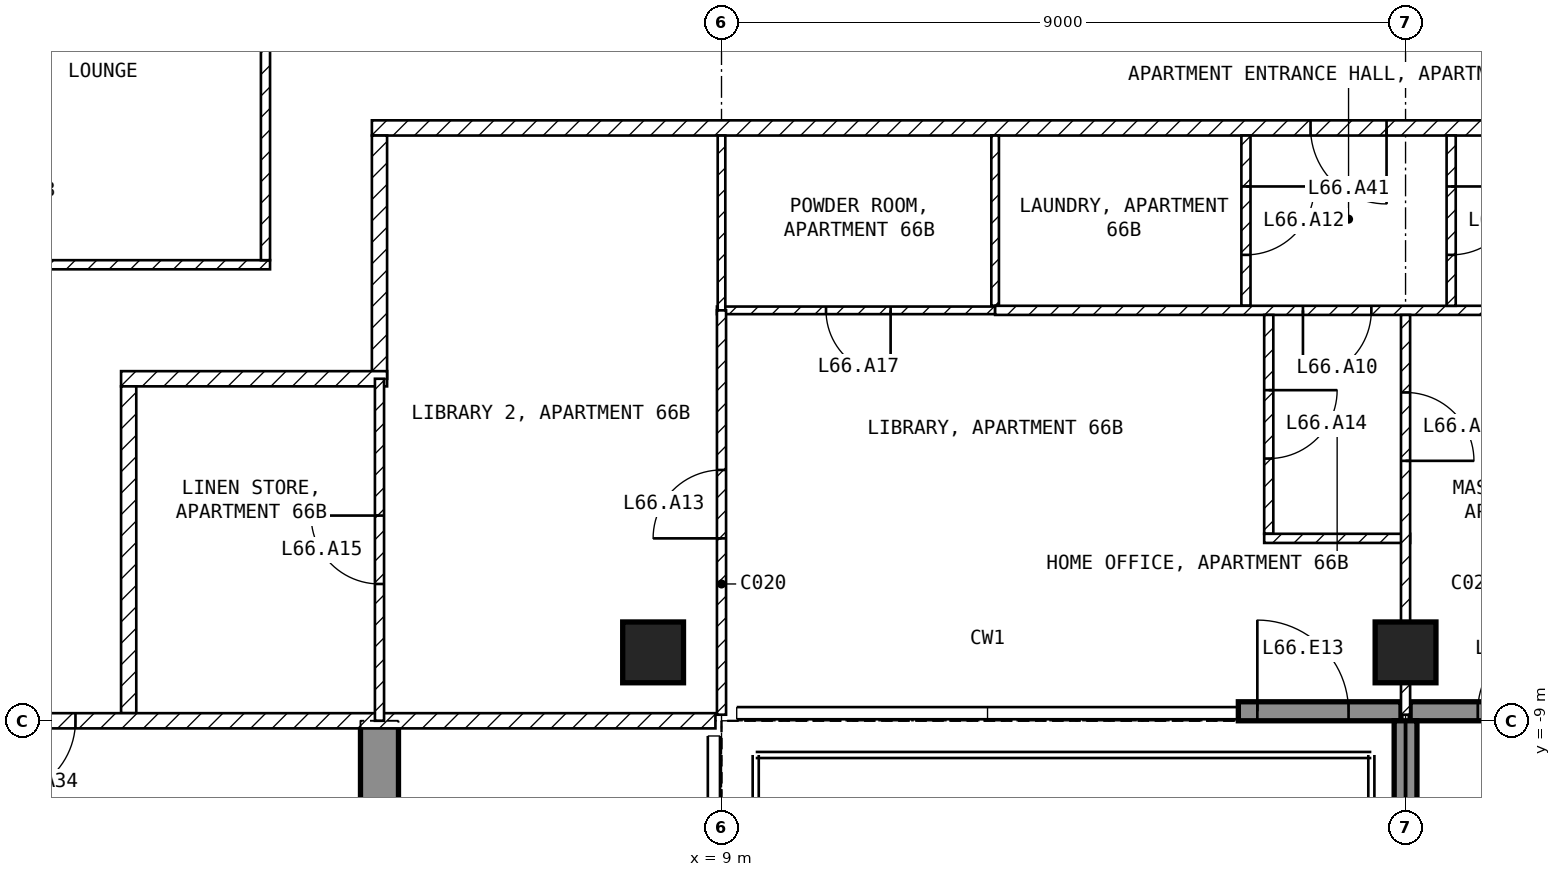
"""IFC4 building model, lengths in metres.
Left out: names, types, materials, properties, quantities, classifications, styles, units other than length and angle.
Written with IfcOpenShell. Run it as: python <this file> out.ifc"""

import sys

from ifc_helpers import new_model, si_unit, direction, frame, frame_2d, origin, origin_2d, place, context, subcontext, project, spatial, polyline, rectangle, outline, extrude, element, fill, save


model = new_model("IFC4")
c1 = context("Model", 3, precision=1e-05, world=origin(), true_north=direction((0.0, 1.0)))
c2 = subcontext(c1, "Body", "Model", "MODEL_VIEW")
j1 = project(units=[si_unit("LENGTHUNIT", "METRE"), si_unit("PLANEANGLEUNIT", "RADIAN")], contexts=[c1])
p1 = place(None, origin())
s1 = spatial("IfcSite", under=j1, at=p1, CompositionType="ELEMENT")
p2 = place(p1, origin())
s2 = spatial("IfcBuilding", under=s1, at=p2, CompositionType="ELEMENT")
p3 = place(p2, frame((0.0, 0.0, 260.5)))
s3 = spatial("IfcBuildingStorey", under=s2, at=p3, CompositionType="ELEMENT", Elevation=260.5)
for number, where, z_axis, x_axis in (
    (1, (8.1, -8.1, -0.25), (0.0, 0.0, 1.0), (1.0, 0.0, 0.0)),
    (2, (18.0, -8.1, -0.25), (0.0, 0.0, 1.0), (1.0, 0.0, 0.0)),
):
    element("IfcColumn", number, at=place(p3, frame(where, z_axis=z_axis, x_axis=x_axis)), inside=s3, PredefinedType="COLUMN", context=c2, shape_type="SweptSolid", body=[
        extrude(rectangle(XDim=0.8, YDim=0.8, at=origin_2d()), origin(), (0.0, 0.0, 1.0), 3.5),
    ])
p4 = place(p3, frame((4.25, -16.7, -0.25), z_axis=(1.0, 0.0, 0.0), x_axis=(0.0, 1.0, 0.0)))
e3 = element("IfcWall", 3, at=p4, inside=s3, PredefinedType="SHEAR", context=c2, shape_type="SweptSolid", body=[
    extrude(outline(polyline([(0.0, 0.0), (3.2, 0.0), (3.2, 2.65), (5.6, 2.65), (5.6, 0.0), (7.7, 0.0), (7.7, 3.5), (0.0, 3.5), (0.0, 0.0)])), origin(), (0.0, 0.0, 1.0), 0.5),
])
p5 = place(p3, frame((15.8, -8.875, 0.0), z_axis=(0.0, 0.0, 1.0), x_axis=(1.0, 0.0, 0.0)))
e4 = element("IfcWall", 4, at=p5, inside=s3, PredefinedType="SOLIDWALL", context=c2, shape_type="SweptSolid", body=[
    extrude(rectangle(XDim=2.14, YDim=0.25, at=frame_2d((1.07, 0.0))), origin(), (0.0, 0.0, 1.0), 3.25),
])
p6 = place(p5, frame((0.25, 0.0, 0.0)))
e5 = element("IfcOpeningElement", 5, at=p6, cuts=e4, PredefinedType="OPENING", context=c2, shape_type="SweptSolid", body=[
    extrude(rectangle(XDim=1.2, YDim=2.4, at=frame_2d((0.6, 1.2))), frame((0.0, 0.135, 0.0), z_axis=(0.0, -1.0, 0.0), x_axis=(1.0, 0.0, 0.0)), (0.0, 0.0, 1.0), 0.27),
])
p7 = place(p3, frame((18.06, -8.875, 0.0), z_axis=(0.0, 0.0, 1.0), x_axis=(1.0, 0.0, 0.0)))
e6 = element("IfcWall", 6, at=p7, inside=s3, PredefinedType="SOLIDWALL", context=c2, shape_type="SweptSolid", body=[
    extrude(rectangle(XDim=3.04, YDim=0.25, at=frame_2d((1.52, 0.0))), origin(), (0.0, 0.0, 1.0), 3.25),
])
p8 = place(p7, frame((0.89, 0.0, 0.0)))
e7 = element("IfcOpeningElement", 7, at=p8, cuts=e6, PredefinedType="OPENING", context=c2, shape_type="SweptSolid", body=[
    extrude(rectangle(XDim=1.0, YDim=2.4, at=frame_2d((0.5, 1.2))), frame((0.0, 0.135, 0.0), z_axis=(0.0, -1.0, 0.0), x_axis=(1.0, 0.0, 0.0)), (0.0, 0.0, 1.0), 0.27),
])
p9 = place(p3, frame((18.0, -9.0, 0.0), z_axis=(0.0, 0.0, 1.0), x_axis=(0.0, -1.0, 0.0)))
e8 = element("IfcWall", 8, at=p9, inside=s3, PredefinedType="SOLIDWALL", context=c2, shape_type="SweptSolid", body=[
    extrude(rectangle(XDim=2.74, YDim=0.3, at=frame_2d((1.37, 0.0))), origin(), (0.0, 0.0, 1.0), 3.25),
])
p10 = place(p3, frame((-3.06, -3.0, 0.0), z_axis=(0.0, 0.0, 1.0), x_axis=(1.0, 0.0, 0.0)))
e9 = element("IfcWall", 9, at=p10, inside=s3, PredefinedType="PARTITIONING", context=c2, shape_type="SweptSolid", body=[
    extrude(rectangle(XDim=6.12, YDim=0.12, at=frame_2d((3.06, 0.0))), origin(), (0.0, 0.0, 1.0), 3.25),
])
p11 = place(p3, frame((3.0, -2.94, 0.0), z_axis=(0.0, 0.0, 1.0), x_axis=(0.0, 1.0, 0.0)))
e10 = element("IfcWall", 10, at=p11, inside=s3, PredefinedType="PARTITIONING", context=c2, shape_type="SweptSolid", body=[
    extrude(rectangle(XDim=5.88, YDim=0.12, at=frame_2d((2.94, 0.0))), origin(), (0.0, 0.0, 1.0), 3.25),
])
p12 = place(p3, frame((21.6, -1.2, 0.0), z_axis=(0.0, 0.0, 1.0), x_axis=(-1.0, 0.0, 0.0)))
e11 = element("IfcWall", 11, at=p12, inside=s3, PredefinedType="PARTITIONING", context=c2, shape_type="SweptSolid", body=[
    extrude(rectangle(XDim=17.2, YDim=0.2, at=frame_2d((8.6, 0.0))), origin(), (0.0, 0.0, 1.0), 3.25),
])
p13 = place(p12, frame((3.85, 0.0, 0.0)))
e12 = element("IfcOpeningElement", 12, at=p13, cuts=e11, PredefinedType="OPENING", context=c2, shape_type="SweptSolid", body=[
    extrude(rectangle(XDim=1.0, YDim=2.1, at=frame_2d((0.5, 1.05))), frame((0.0, 0.11, 0.0), z_axis=(0.0, -1.0, 0.0), x_axis=(1.0, 0.0, 0.0)), (0.0, 0.0, 1.0), 0.22),
])
p14 = place(p3, frame((4.5, -1.3, 0.0), z_axis=(0.0, 0.0, 1.0), x_axis=(0.0, -1.0, 0.0)))
e13 = element("IfcWall", 13, at=p14, inside=s3, PredefinedType="PARTITIONING", context=c2, shape_type="SweptSolid", body=[
    extrude(rectangle(XDim=3.2, YDim=0.2, at=frame_2d((1.6, 0.0))), origin(), (0.0, 0.0, 1.0), 3.25),
])
p15 = place(p3, frame((4.6, -4.5, 0.0), z_axis=(0.0, 0.0, 1.0), x_axis=(-1.0, 0.0, 0.0)))
e14 = element("IfcWall", 14, at=p15, inside=s3, PredefinedType="PARTITIONING", context=c2, shape_type="SweptSolid", body=[
    extrude(rectangle(XDim=3.5, YDim=0.2, at=frame_2d((1.75, 0.0))), origin(), (0.0, 0.0, 1.0), 3.25),
])
p16 = place(p3, frame((1.2, -4.6, 0.0), z_axis=(0.0, 0.0, 1.0), x_axis=(0.0, -1.0, 0.0)))
e15 = element("IfcWall", 15, at=p16, inside=s3, PredefinedType="PARTITIONING", context=c2, shape_type="SweptSolid", body=[
    extrude(rectangle(XDim=4.3, YDim=0.2, at=frame_2d((2.15, 0.0))), origin(), (0.0, 0.0, 1.0), 3.25),
])
p17 = place(p3, frame((8.92, -9.0, 0.0), z_axis=(0.0, 0.0, 1.0), x_axis=(-1.0, 0.0, 0.0)))
e16 = element("IfcWall", 16, at=p17, inside=s3, PredefinedType="PARTITIONING", context=c2, shape_type="SweptSolid", body=[
    extrude(rectangle(XDim=17.84, YDim=0.2, at=frame_2d((8.92, 0.0))), origin(), (0.0, 0.0, 1.0), 3.25),
])
p18 = place(p17, frame((8.42, 0.0, 0.0)))
e17 = element("IfcOpeningElement", 17, at=p18, cuts=e16, PredefinedType="OPENING", context=c2, shape_type="SweptSolid", body=[
    extrude(rectangle(XDim=1.0, YDim=2.1, at=frame_2d((0.5, 1.05))), frame((0.0, 0.11, 0.0), z_axis=(0.0, -1.0, 0.0), x_axis=(1.0, 0.0, 0.0)), (0.0, 0.0, 1.0), 0.22),
])
p19 = place(p3, frame((12.6, -1.3, 0.0), z_axis=(0.0, 0.0, 1.0), x_axis=(0.0, -1.0, 0.0)))
e18 = element("IfcWall", 18, at=p19, inside=s3, PredefinedType="PARTITIONING", context=c2, shape_type="SweptSolid", body=[
    extrude(rectangle(XDim=2.24, YDim=0.1, at=frame_2d((1.12, 0.0))), origin(), (0.0, 0.0, 1.0), 3.25),
])
p20 = place(p3, frame((12.6, -3.6, 0.0), z_axis=(0.0, 0.0, 1.0), x_axis=(-1.0, 0.0, 0.0)))
e19 = element("IfcWall", 19, at=p20, inside=s3, PredefinedType="PARTITIONING", context=c2, shape_type="SweptSolid", body=[
    extrude(rectangle(XDim=3.66, YDim=0.1, at=frame_2d((1.83, 0.0))), origin(), (0.0, 0.0, 1.0), 3.25),
])
p21 = place(p20, frame((1.375, 0.0, 0.0)))
e20 = element("IfcOpeningElement", 20, at=p21, cuts=e19, PredefinedType="OPENING", context=c2, shape_type="SweptSolid", body=[
    extrude(rectangle(XDim=0.85, YDim=2.1, at=frame_2d((0.425, 1.05))), frame((0.0, 0.06, 0.0), z_axis=(0.0, -1.0, 0.0), x_axis=(1.0, 0.0, 0.0)), (0.0, 0.0, 1.0), 0.12),
])
p22 = place(p3, frame((9.0, -3.6, 0.0), z_axis=(0.0, 0.0, 1.0), x_axis=(0.0, 1.0, 0.0)))
e21 = element("IfcWall", 21, at=p22, inside=s3, PredefinedType="PARTITIONING", context=c2, shape_type="SweptSolid", body=[
    extrude(rectangle(XDim=2.3, YDim=0.1, at=frame_2d((1.15, 0.0))), origin(), (0.0, 0.0, 1.0), 3.25),
])
p23 = place(p3, frame((15.9, -1.3, 0.0), z_axis=(0.0, 0.0, 1.0), x_axis=(0.0, -1.0, 0.0)))
e22 = element("IfcWall", 22, at=p23, inside=s3, PredefinedType="PARTITIONING", context=c2, shape_type="SweptSolid", body=[
    extrude(rectangle(XDim=2.24, YDim=0.12, at=frame_2d((1.12, 0.0))), origin(), (0.0, 0.0, 1.0), 3.25),
])
p24 = place(p23, frame((0.67, 0.0, 0.0)))
e23 = element("IfcOpeningElement", 23, at=p24, cuts=e22, PredefinedType="OPENING", context=c2, shape_type="SweptSolid", body=[
    extrude(rectangle(XDim=0.9, YDim=2.1, at=frame_2d((0.45, 1.05))), frame((0.0, 0.07, 0.0), z_axis=(0.0, -1.0, 0.0), x_axis=(1.0, 0.0, 0.0)), (0.0, 0.0, 1.0), 0.14),
])
p25 = place(p3, frame((21.6, -3.6, 0.0), z_axis=(0.0, 0.0, 1.0), x_axis=(-1.0, 0.0, 0.0)))
e24 = element("IfcWall", 24, at=p25, inside=s3, PredefinedType="PARTITIONING", context=c2, shape_type="SweptSolid", body=[
    extrude(rectangle(XDim=9.0, YDim=0.12, at=frame_2d((4.5, 0.0))), origin(), (0.0, 0.0, 1.0), 3.25),
])
p26 = place(p25, frame((4.05, 0.0, 0.0)))
e25 = element("IfcOpeningElement", 25, at=p26, cuts=e24, PredefinedType="OPENING", context=c2, shape_type="SweptSolid", body=[
    extrude(rectangle(XDim=0.9, YDim=2.1, at=frame_2d((0.45, 1.05))), frame((0.0, 0.07, 0.0), z_axis=(0.0, -1.0, 0.0), x_axis=(1.0, 0.0, 0.0)), (0.0, 0.0, 1.0), 0.14),
])
p27 = place(p3, frame((18.6, -1.3, 0.0), z_axis=(0.0, 0.0, 1.0), x_axis=(0.0, -1.0, 0.0)))
e26 = element("IfcWall", 26, at=p27, inside=s3, PredefinedType="PARTITIONING", context=c2, shape_type="SweptSolid", body=[
    extrude(rectangle(XDim=2.24, YDim=0.12, at=frame_2d((1.12, 0.0))), origin(), (0.0, 0.0, 1.0), 3.25),
])
p28 = place(p27, frame((0.67, 0.0, 0.0)))
e27 = element("IfcOpeningElement", 27, at=p28, cuts=e26, PredefinedType="OPENING", context=c2, shape_type="SweptSolid", body=[
    extrude(rectangle(XDim=0.9, YDim=2.1, at=frame_2d((0.45, 1.05))), frame((0.0, 0.07, 0.0), z_axis=(0.0, -1.0, 0.0), x_axis=(1.0, 0.0, 0.0)), (0.0, 0.0, 1.0), 0.14),
])
p29 = place(p3, frame((16.2, -3.66, 0.0), z_axis=(0.0, 0.0, 1.0), x_axis=(0.0, -1.0, 0.0)))
e28 = element("IfcWall", 28, at=p29, inside=s3, PredefinedType="PARTITIONING", context=c2, shape_type="SweptSolid", body=[
    extrude(rectangle(XDim=2.88, YDim=0.12, at=frame_2d((1.44, 0.0))), origin(), (0.0, 0.0, 1.0), 3.25),
])
p30 = place(p29, frame((0.99, 0.0, 0.0)))
e29 = element("IfcOpeningElement", 29, at=p30, cuts=e28, PredefinedType="OPENING", context=c2, shape_type="SweptSolid", body=[
    extrude(rectangle(XDim=0.9, YDim=2.1, at=frame_2d((0.45, 1.05))), frame((0.0, 0.07, 0.0), z_axis=(0.0, -1.0, 0.0), x_axis=(1.0, 0.0, 0.0)), (0.0, 0.0, 1.0), 0.14),
])
p31 = place(p3, frame((16.14, -6.6, 0.0), z_axis=(0.0, 0.0, 1.0), x_axis=(1.0, 0.0, 0.0)))
e30 = element("IfcWall", 30, at=p31, inside=s3, PredefinedType="PARTITIONING", context=c2, shape_type="SweptSolid", body=[
    extrude(rectangle(XDim=1.92, YDim=0.12, at=frame_2d((0.96, 0.0))), origin(), (0.0, 0.0, 1.0), 3.25),
])
p32 = place(p3, frame((18.0, -3.66, 0.0), z_axis=(0.0, 0.0, 1.0), x_axis=(0.0, -1.0, 0.0)))
e31 = element("IfcWall", 31, at=p32, inside=s3, PredefinedType="PARTITIONING", context=c2, shape_type="SweptSolid", body=[
    extrude(rectangle(XDim=5.26, YDim=0.12, at=frame_2d((2.63, 0.0))), origin(), (0.0, 0.0, 1.0), 2.496),
])
p33 = place(p32, frame((1.02, 0.0, 0.0)))
e32 = element("IfcOpeningElement", 32, at=p33, cuts=e31, PredefinedType="OPENING", context=c2, shape_type="SweptSolid", body=[
    extrude(rectangle(XDim=0.9, YDim=2.1, at=frame_2d((0.45, 1.05))), frame((0.0, 0.07, 0.0), z_axis=(0.0, -1.0, 0.0), x_axis=(1.0, 0.0, 0.0)), (0.0, 0.0, 1.0), 0.14),
])
p34 = place(p3, frame((9.0, -8.92, 0.0), z_axis=(0.0, 0.0, 1.0), x_axis=(0.0, 1.0, 0.0)))
e33 = element("IfcWall", 33, at=p34, inside=s3, PredefinedType="PARTITIONING", context=c2, shape_type="SweptSolid", body=[
    extrude(rectangle(XDim=5.32, YDim=0.12, at=frame_2d((2.66, 0.0))), origin(), (0.0, 0.0, 1.0), 3.25),
])
p35 = place(p34, frame((2.32, 0.0, 0.0)))
e34 = element("IfcOpeningElement", 34, at=p35, cuts=e33, PredefinedType="OPENING", context=c2, shape_type="SweptSolid", body=[
    extrude(rectangle(XDim=0.9, YDim=2.1, at=frame_2d((0.45, 1.05))), frame((0.0, 0.07, 0.0), z_axis=(0.0, -1.0, 0.0), x_axis=(1.0, 0.0, 0.0)), (0.0, 0.0, 1.0), 0.14),
])
p36 = place(p3, frame((4.5, -9.0, 0.0), z_axis=(0.0, 0.0, 1.0), x_axis=(0.0, 1.0, 0.0)))
e35 = element("IfcWall", 35, at=p36, inside=s3, PredefinedType="PARTITIONING", context=c2, shape_type="SweptSolid", body=[
    extrude(rectangle(XDim=4.5, YDim=0.12, at=frame_2d((2.25, 0.0))), origin(), (0.0, 0.0, 1.0), 3.25),
])
p37 = place(p36, frame((1.8, 0.0, 0.0)))
e36 = element("IfcOpeningElement", 36, at=p37, cuts=e35, PredefinedType="OPENING", context=c2, shape_type="SweptSolid", body=[
    extrude(rectangle(XDim=0.9, YDim=2.1, at=frame_2d((0.45, 1.05))), frame((0.0, 0.07, 0.0), z_axis=(0.0, -1.0, 0.0), x_axis=(1.0, 0.0, 0.0)), (0.0, 0.0, 1.0), 0.14),
])
p38 = place(p6, origin())
e37 = element("IfcDoor", 37, at=p38, inside=s3, OperationType="SINGLE_SWING_LEFT", PredefinedType="DOOR", context=c2, shape_type="SweptSolid", body=[
    extrude(rectangle(XDim=1.2, YDim=2.4, at=frame_2d((0.6, 1.2))), frame((0.0, 0.025, 0.0), z_axis=(0.0, -1.0, 0.0), x_axis=(1.0, 0.0, 0.0)), (0.0, 0.0, 1.0), 0.05),
])
fill(e5, e37)
p39 = place(p8, origin())
e38 = element("IfcDoor", 38, at=p39, inside=s3, OperationType="SINGLE_SWING_RIGHT", PredefinedType="DOOR", context=c2, shape_type="SweptSolid", body=[
    extrude(rectangle(XDim=1.0, YDim=2.4, at=frame_2d((0.5, 1.2))), frame((0.0, 0.025, 0.0), z_axis=(0.0, -1.0, 0.0), x_axis=(1.0, 0.0, 0.0)), (0.0, 0.0, 1.0), 0.05),
])
fill(e7, e38)
p40 = place(p26, origin())
e39 = element("IfcDoor", 39, at=p40, inside=s3, OperationType="SINGLE_SWING_RIGHT", PredefinedType="DOOR", context=c2, shape_type="SweptSolid", body=[
    extrude(rectangle(XDim=0.9, YDim=2.1, at=frame_2d((0.45, 1.05))), frame((0.0, 0.025, 0.0), z_axis=(0.0, -1.0, 0.0), x_axis=(1.0, 0.0, 0.0)), (0.0, 0.0, 1.0), 0.05),
])
fill(e25, e39)
p41 = place(p28, origin())
e40 = element("IfcDoor", 40, at=p41, inside=s3, OperationType="SINGLE_SWING_LEFT", PredefinedType="DOOR", context=c2, shape_type="SweptSolid", body=[
    extrude(rectangle(XDim=0.9, YDim=2.1, at=frame_2d((0.45, 1.05))), frame((0.0, 0.025, 0.0), z_axis=(0.0, -1.0, 0.0), x_axis=(1.0, 0.0, 0.0)), (0.0, 0.0, 1.0), 0.05),
])
fill(e27, e40)
p42 = place(p24, origin())
e41 = element("IfcDoor", 41, at=p42, inside=s3, OperationType="SINGLE_SWING_LEFT", PredefinedType="DOOR", context=c2, shape_type="SweptSolid", body=[
    extrude(rectangle(XDim=0.9, YDim=2.1, at=frame_2d((0.45, 1.05))), frame((0.0, 0.025, 0.0), z_axis=(0.0, -1.0, 0.0), x_axis=(1.0, 0.0, 0.0)), (0.0, 0.0, 1.0), 0.05),
])
fill(e23, e41)
p43 = place(p35, origin())
e42 = element("IfcDoor", 42, at=p43, inside=s3, OperationType="SINGLE_SWING_LEFT", PredefinedType="DOOR", context=c2, shape_type="SweptSolid", body=[
    extrude(rectangle(XDim=0.9, YDim=2.1, at=frame_2d((0.45, 1.05))), frame((0.0, 0.025, 0.0), z_axis=(0.0, -1.0, 0.0), x_axis=(1.0, 0.0, 0.0)), (0.0, 0.0, 1.0), 0.05),
])
fill(e34, e42)
p44 = place(p30, origin())
e43 = element("IfcDoor", 43, at=p44, inside=s3, OperationType="SINGLE_SWING_LEFT", PredefinedType="DOOR", context=c2, shape_type="SweptSolid", body=[
    extrude(rectangle(XDim=0.9, YDim=2.1, at=frame_2d((0.45, 1.05))), frame((0.0, 0.025, 0.0), z_axis=(0.0, -1.0, 0.0), x_axis=(1.0, 0.0, 0.0)), (0.0, 0.0, 1.0), 0.05),
])
fill(e29, e43)
p45 = place(p37, origin())
e44 = element("IfcDoor", 44, at=p45, inside=s3, OperationType="SINGLE_SWING_RIGHT", PredefinedType="DOOR", context=c2, shape_type="SweptSolid", body=[
    extrude(rectangle(XDim=0.9, YDim=2.1, at=frame_2d((0.45, 1.05))), frame((0.0, 0.025, 0.0), z_axis=(0.0, -1.0, 0.0), x_axis=(1.0, 0.0, 0.0)), (0.0, 0.0, 1.0), 0.05),
])
fill(e36, e44)
p46 = place(p33, origin())
e45 = element("IfcDoor", 45, at=p46, inside=s3, OperationType="SINGLE_SWING_RIGHT", PredefinedType="DOOR", context=c2, shape_type="SweptSolid", body=[
    extrude(rectangle(XDim=0.9, YDim=2.1, at=frame_2d((0.45, 1.05))), frame((0.0, 0.025, 0.0), z_axis=(0.0, -1.0, 0.0), x_axis=(1.0, 0.0, 0.0)), (0.0, 0.0, 1.0), 0.05),
])
fill(e32, e45)
p47 = place(p21, origin())
e46 = element("IfcDoor", 46, at=p47, inside=s3, OperationType="SINGLE_SWING_LEFT", PredefinedType="DOOR", context=c2, shape_type="SweptSolid", body=[
    extrude(rectangle(XDim=0.85, YDim=2.1, at=frame_2d((0.425, 1.05))), frame((0.0, 0.025, 0.0), z_axis=(0.0, -1.0, 0.0), x_axis=(1.0, 0.0, 0.0)), (0.0, 0.0, 1.0), 0.05),
])
fill(e20, e46)
p48 = place(p18, origin())
e47 = element("IfcDoor", 47, at=p48, inside=s3, OperationType="SINGLE_SWING_RIGHT", PredefinedType="DOOR", context=c2, shape_type="SweptSolid", body=[
    extrude(rectangle(XDim=1.0, YDim=2.1, at=frame_2d((0.5, 1.05))), frame((0.0, 0.025, 0.0), z_axis=(0.0, -1.0, 0.0), x_axis=(1.0, 0.0, 0.0)), (0.0, 0.0, 1.0), 0.05),
])
fill(e17, e47)
p49 = place(p13, origin())
e48 = element("IfcDoor", 48, at=p49, inside=s3, OperationType="SINGLE_SWING_LEFT", PredefinedType="DOOR", context=c2, shape_type="SweptSolid", body=[
    extrude(rectangle(XDim=1.0, YDim=2.1, at=frame_2d((0.5, 1.05))), frame((0.0, 0.025, 0.0), z_axis=(0.0, -1.0, 0.0), x_axis=(1.0, 0.0, 0.0)), (0.0, 0.0, 1.0), 0.05),
])
fill(e12, e48)
save(model, sys.argv[1])
